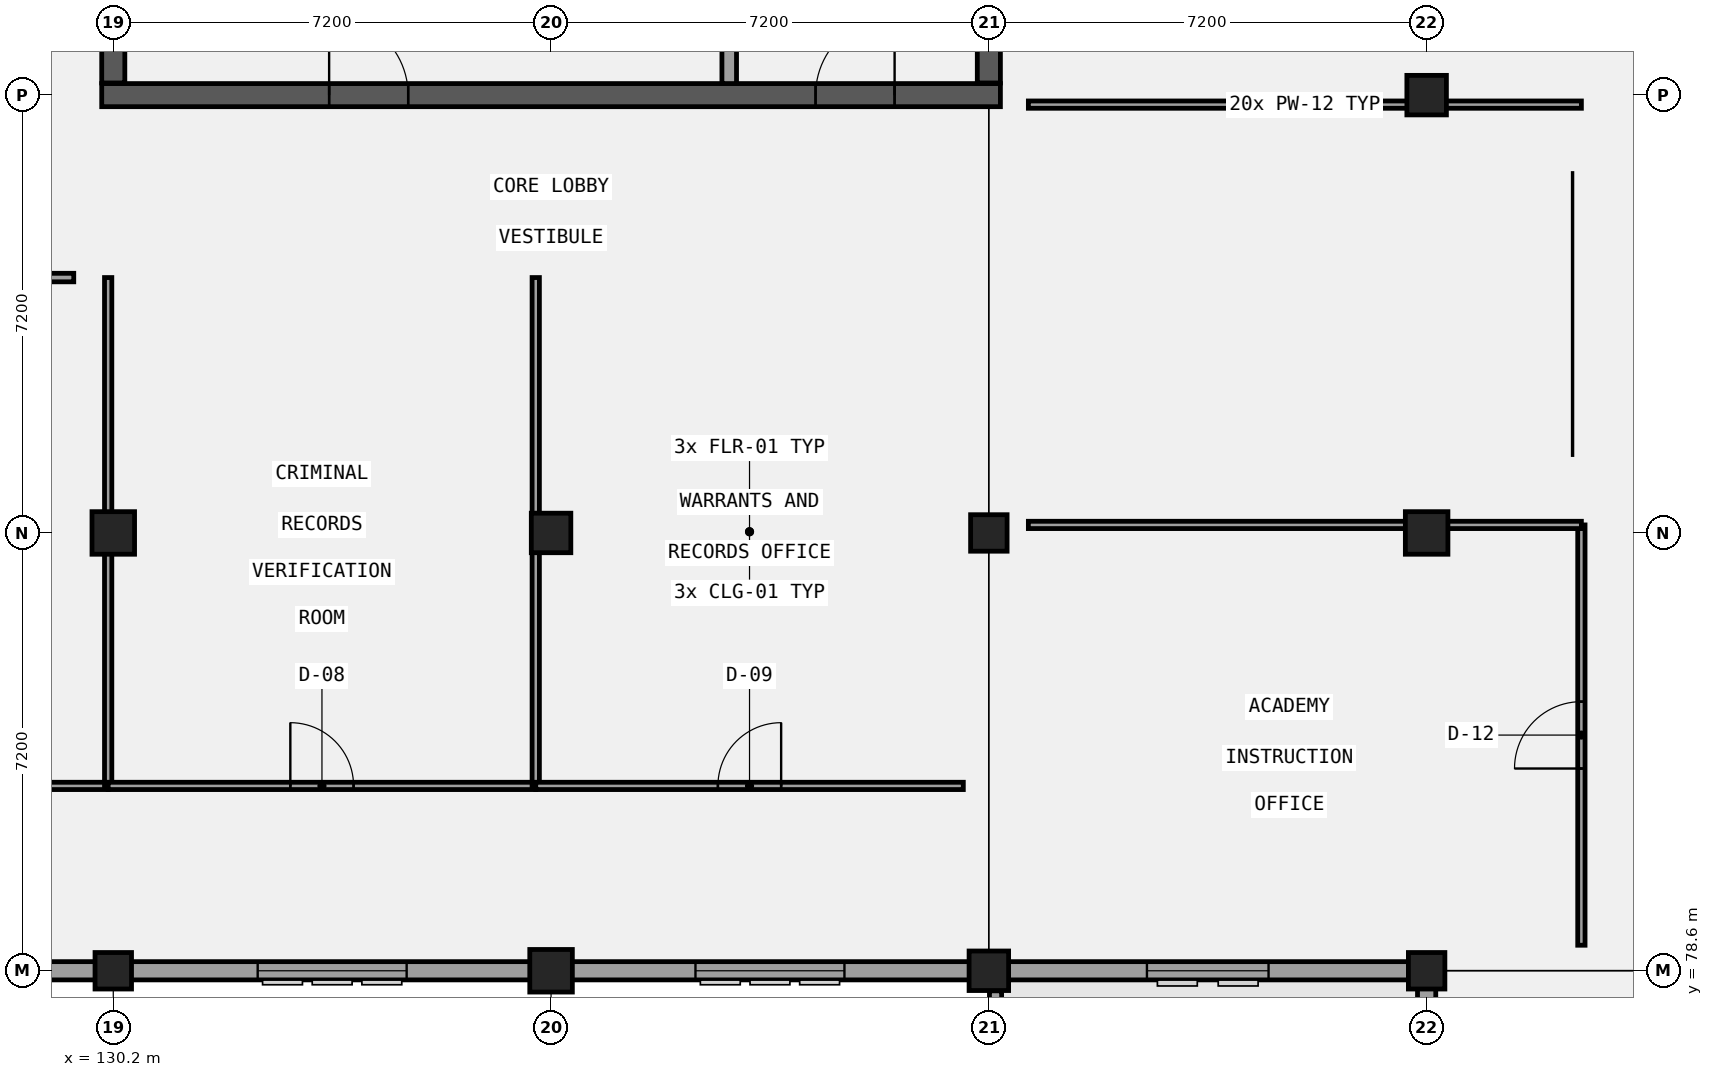
"""IFC4 building model, lengths in metres.
Left out: names, types, materials, properties, quantities, classifications, styles, units other than length and angle.
Written with IfcOpenShell. Run it as: python <this file> out.ifc"""

import sys

from ifc_helpers import new_model, si_unit, direction, frame, frame_2d, origin, origin_2d, place, context, subcontext, project, spatial, rectangle, extrude, element, fill, save


model = new_model("IFC4")
c1 = context("Model", 3, precision=1e-05, world=origin(), true_north=direction((0.0, 1.0)))
c2 = subcontext(c1, "Body", "Model", "MODEL_VIEW")
j1 = project(units=[si_unit("LENGTHUNIT", "METRE"), si_unit("PLANEANGLEUNIT", "RADIAN")], contexts=[c1])
p1 = place(None, origin())
s1 = spatial("IfcSite", under=j1, at=p1, CompositionType="ELEMENT")
p2 = place(p1, origin())
s2 = spatial("IfcBuilding", under=s1, at=p2, CompositionType="ELEMENT")
p3 = place(p2, frame((0.0, 0.0, 13.8)))
s3 = spatial("IfcBuildingStorey", under=s2, at=p3, CompositionType="ELEMENT", Elevation=13.8)
p4 = place(p3, frame((130.01, 93.0, 0.0), z_axis=(0.0, 0.0, 1.0), x_axis=(1.0, 0.0, 0.0)))
e1 = element("IfcWall", 1, at=p4, inside=s3, PredefinedType="SHEAR", context=c2, shape_type="SweptSolid", body=[
    extrude(rectangle(XDim=14.78, YDim=0.38, at=frame_2d((7.39, 0.0))), origin(), (0.0, 0.0, 1.0), 4.2),
])
p5 = place(p4, frame((3.74, 0.0, 0.0)))
e2 = element("IfcOpeningElement", 2, at=p5, cuts=e1, PredefinedType="OPENING", context=c2, shape_type="SweptSolid", body=[
    extrude(rectangle(XDim=1.3, YDim=2.2, at=frame_2d((0.65, 1.1))), frame((0.0, 0.2, 0.0), z_axis=(0.0, -1.0, 0.0), x_axis=(1.0, 0.0, 0.0)), (0.0, 0.0, 1.0), 0.4),
])
p6 = place(p4, frame((11.74, 0.0, 0.0)))
e3 = element("IfcOpeningElement", 3, at=p6, cuts=e1, PredefinedType="OPENING", context=c2, shape_type="SweptSolid", body=[
    extrude(rectangle(XDim=1.3, YDim=2.2, at=frame_2d((0.65, 1.1))), frame((0.0, 0.2, 0.0), z_axis=(0.0, -1.0, 0.0), x_axis=(1.0, 0.0, 0.0)), (0.0, 0.0, 1.0), 0.4),
])
for number, where, z_axis, x_axis in (
    (4, (130.2, 93.2, 0.0), (0.0, 0.0, 1.0), (0.0, 1.0, 0.0)),
    (5, (144.6, 93.2, 0.0), (0.0, 0.0, 1.0), (0.0, 1.0, 0.0)),
):
    element("IfcWall", number, at=place(p3, frame(where, z_axis=z_axis, x_axis=x_axis)), inside=s3, PredefinedType="SHEAR", context=c2, shape_type="SweptSolid", body=[
        extrude(rectangle(XDim=6.8, YDim=0.38, at=frame_2d((3.4, 0.0))), origin(), (0.0, 0.0, 1.0), 4.2),
    ])
p7 = place(p3, frame((130.2, 78.6, 0.0), z_axis=(0.0, 0.0, 1.0), x_axis=(1.0, 0.0, 0.0)))
e6 = element("IfcColumn", 6, at=p7, inside=s3, PredefinedType="COLUMN", context=c2, shape_type="SweptSolid", body=[
    extrude(rectangle(XDim=0.6, YDim=0.6, at=origin_2d()), origin(), (0.0, 0.0, 1.0), 4.2),
])
for number, where, z_axis, x_axis in (
    (7, (130.2, 85.8, 0.0), (0.0, 0.0, 1.0), (1.0, 0.0, 0.0)),
    (8, (137.4, 78.6, 0.0), (0.0, 0.0, 1.0), (1.0, 0.0, 0.0)),
):
    element("IfcColumn", number, at=place(p3, frame(where, z_axis=z_axis, x_axis=x_axis)), inside=s3, PredefinedType="COLUMN", context=c2, shape_type="SweptSolid", body=[
        extrude(rectangle(XDim=0.7, YDim=0.7, at=origin_2d()), origin(), (0.0, 0.0, 1.0), 4.2),
    ])
for number, where, z_axis, x_axis in (
    (9, (137.4, 85.8, 0.0), (0.0, 0.0, 1.0), (1.0, 0.0, 0.0)),
    (10, (144.6, 78.6, 0.0), (0.0, 0.0, 1.0), (1.0, 0.0, 0.0)),
):
    element("IfcColumn", number, at=place(p3, frame(where, z_axis=z_axis, x_axis=x_axis)), inside=s3, PredefinedType="COLUMN", context=c2, shape_type="SweptSolid", body=[
        extrude(rectangle(XDim=0.65, YDim=0.65, at=origin_2d()), origin(), (0.0, 0.0, 1.0), 4.2),
    ])
for number, where, z_axis, x_axis in (
    (11, (144.6, 85.8, 0.0), (0.0, 0.0, 1.0), (1.0, 0.0, 0.0)),
    (12, (151.8, 78.6, 0.0), (0.0, 0.0, 1.0), (1.0, 0.0, 0.0)),
):
    element("IfcColumn", number, at=place(p3, frame(where, z_axis=z_axis, x_axis=x_axis)), inside=s3, PredefinedType="COLUMN", context=c2, shape_type="SweptSolid", body=[
        extrude(rectangle(XDim=0.6, YDim=0.6, at=origin_2d()), origin(), (0.0, 0.0, 1.0), 4.2),
    ])
p8 = place(p3, frame((151.8, 85.8, 0.0), z_axis=(0.0, 0.0, 1.0), x_axis=(1.0, 0.0, 0.0)))
e13 = element("IfcColumn", 13, at=p8, inside=s3, PredefinedType="COLUMN", context=c2, shape_type="SweptSolid", body=[
    extrude(rectangle(XDim=0.7, YDim=0.7, at=origin_2d()), origin(), (0.0, 0.0, 1.0), 4.2),
])
p9 = place(p3, frame((151.8, 93.0, 0.0), z_axis=(0.0, 0.0, 1.0), x_axis=(1.0, 0.0, 0.0)))
e14 = element("IfcColumn", 14, at=p9, inside=s3, PredefinedType="COLUMN", context=c2, shape_type="SweptSolid", body=[
    extrude(rectangle(XDim=0.65, YDim=0.65, at=origin_2d()), origin(), (0.0, 0.0, 1.0), 4.2),
])
p10 = place(p3, frame((140.33, 93.19, 0.0), z_axis=(0.0, 0.0, 1.0), x_axis=(0.0, 1.0, 0.0)))
e15 = element("IfcWall", 15, at=p10, inside=s3, PredefinedType="SOLIDWALL", context=c2, shape_type="SweptSolid", body=[
    extrude(rectangle(XDim=3.24, YDim=0.24, at=frame_2d((1.62, 0.0))), origin(), (0.0, 0.0, 1.0), 3.91),
])
p11 = place(p3, frame((108.45, 78.6, 0.0), z_axis=(0.0, 0.0, 1.0), x_axis=(1.0, 0.0, 0.0)))
e16 = element("IfcWall", 16, at=p11, inside=s3, PredefinedType="SOLIDWALL", context=c2, shape_type="SweptSolid", body=[
    extrude(rectangle(XDim=36.3, YDim=0.3, at=frame_2d((18.15, 0.0))), origin(), (0.0, 0.0, 1.0), 2.94),
])
p12 = place(p11, frame((2.75, 0.0, 0.95)))
e17 = element("IfcOpeningElement", 17, at=p12, cuts=e16, PredefinedType="OPENING", context=c2, shape_type="SweptSolid", body=[
    extrude(rectangle(XDim=2.0, YDim=1.65, at=frame_2d((1.0, 0.825))), frame((0.0, 0.16, 0.0), z_axis=(0.0, -1.0, 0.0), x_axis=(1.0, 0.0, 0.0)), (0.0, 0.0, 1.0), 0.32),
])
p13 = place(p11, frame((9.85, 0.0, 0.95)))
e18 = element("IfcOpeningElement", 18, at=p13, cuts=e16, PredefinedType="OPENING", context=c2, shape_type="SweptSolid", body=[
    extrude(rectangle(XDim=2.2, YDim=1.4, at=frame_2d((1.1, 0.7))), frame((0.0, 0.16, 0.0), z_axis=(0.0, -1.0, 0.0), x_axis=(1.0, 0.0, 0.0)), (0.0, 0.0, 1.0), 0.32),
])
p14 = place(p11, frame((17.05, 0.0, 0.95)))
e19 = element("IfcOpeningElement", 19, at=p14, cuts=e16, PredefinedType="OPENING", context=c2, shape_type="SweptSolid", body=[
    extrude(rectangle(XDim=2.2, YDim=1.65, at=frame_2d((1.1, 0.825))), frame((0.0, 0.16, 0.0), z_axis=(0.0, -1.0, 0.0), x_axis=(1.0, 0.0, 0.0)), (0.0, 0.0, 1.0), 0.32),
])
p15 = place(p11, frame((24.125, 0.0, 0.95)))
e20 = element("IfcOpeningElement", 20, at=p15, cuts=e16, PredefinedType="OPENING", context=c2, shape_type="SweptSolid", body=[
    extrude(rectangle(XDim=2.45, YDim=1.4, at=frame_2d((1.225, 0.7))), frame((0.0, 0.16, 0.0), z_axis=(0.0, -1.0, 0.0), x_axis=(1.0, 0.0, 0.0)), (0.0, 0.0, 1.0), 0.32),
])
p16 = place(p11, frame((31.325, 0.0, 0.95)))
e21 = element("IfcOpeningElement", 21, at=p16, cuts=e16, PredefinedType="OPENING", context=c2, shape_type="SweptSolid", body=[
    extrude(rectangle(XDim=2.45, YDim=1.65, at=frame_2d((1.225, 0.825))), frame((0.0, 0.16, 0.0), z_axis=(0.0, -1.0, 0.0), x_axis=(1.0, 0.0, 0.0)), (0.0, 0.0, 1.0), 0.32),
])
p17 = place(p3, frame((144.45, 78.6, 0.0), z_axis=(0.0, 0.0, 1.0), x_axis=(1.0, 0.0, 0.0)))
e22 = element("IfcWall", 22, at=p17, inside=s3, PredefinedType="SOLIDWALL", context=c2, shape_type="SweptSolid", body=[
    extrude(rectangle(XDim=7.5, YDim=0.3, at=frame_2d((3.75, 0.0))), origin(), (0.0, 0.0, 1.0), 2.94),
])
p18 = place(p17, frame((2.75, 0.0, 0.95)))
e23 = element("IfcOpeningElement", 23, at=p18, cuts=e22, PredefinedType="OPENING", context=c2, shape_type="SweptSolid", body=[
    extrude(rectangle(XDim=2.0, YDim=1.65, at=frame_2d((1.0, 0.825))), frame((0.0, 0.16, 0.0), z_axis=(0.0, -1.0, 0.0), x_axis=(1.0, 0.0, 0.0)), (0.0, 0.0, 1.0), 0.32),
])
p19 = place(p3, frame((151.8, 78.45, 0.0), z_axis=(0.0, 0.0, 1.0), x_axis=(0.0, -1.0, 0.0)))
e24 = element("IfcWall", 24, at=p19, inside=s3, PredefinedType="SOLIDWALL", context=c2, shape_type="SweptSolid", body=[
    extrude(rectangle(XDim=28.46, YDim=0.3, at=frame_2d((14.23, 0.0))), origin(), (0.0, 0.0, 1.0), 3.19),
])
p20 = place(p19, frame((17.08, 0.0, 0.0)))
e25 = element("IfcOpeningElement", 25, at=p20, cuts=e24, PredefinedType="OPENING", context=c2, shape_type="SweptSolid", body=[
    extrude(rectangle(XDim=1.1, YDim=2.2, at=frame_2d((0.55, 1.1))), frame((0.0, 0.16, 0.0), z_axis=(0.0, -1.0, 0.0), x_axis=(1.0, 0.0, 0.0)), (0.0, 0.0, 1.0), 0.32),
])
p21 = place(p19, frame((24.53, 0.0, 1.0)))
e26 = element("IfcOpeningElement", 26, at=p21, cuts=e24, PredefinedType="OPENING", context=c2, shape_type="SweptSolid", body=[
    extrude(rectangle(XDim=0.85, YDim=1.65, at=frame_2d((0.425, 0.825))), frame((0.0, 0.16, 0.0), z_axis=(0.0, -1.0, 0.0), x_axis=(1.0, 0.0, 0.0)), (0.0, 0.0, 1.0), 0.32),
])
p22 = place(p19, frame((10.225, 0.0, 1.0)))
e27 = element("IfcOpeningElement", 27, at=p22, cuts=e24, PredefinedType="OPENING", context=c2, shape_type="SweptSolid", body=[
    extrude(rectangle(XDim=0.85, YDim=1.65, at=frame_2d((0.425, 0.825))), frame((0.0, 0.16, 0.0), z_axis=(0.0, -1.0, 0.0), x_axis=(1.0, 0.0, 0.0)), (0.0, 0.0, 1.0), 0.32),
])
p23 = place(p19, frame((3.1, 0.0, 1.0)))
e28 = element("IfcOpeningElement", 28, at=p23, cuts=e24, PredefinedType="OPENING", context=c2, shape_type="SweptSolid", body=[
    extrude(rectangle(XDim=0.85, YDim=1.65, at=frame_2d((0.425, 0.825))), frame((0.0, 0.16, 0.0), z_axis=(0.0, -1.0, 0.0), x_axis=(1.0, 0.0, 0.0)), (0.0, 0.0, 1.0), 0.32),
])
p24 = place(p3, frame((144.71, 35.51, 0.0), z_axis=(0.0, 0.0, 1.0), x_axis=(0.0, 1.0, 0.0)))
e29 = element("IfcWall", 29, at=p24, inside=s3, PredefinedType="PARAPET", context=c2, shape_type="SweptSolid", body=[
    extrude(rectangle(XDim=42.76, YDim=0.2, at=frame_2d((21.38, 0.0))), origin(), (0.0, 0.0, 1.0), 1.12),
])
p25 = place(p3, frame((123.084, 81.64, 0.0), z_axis=(0.0, 0.0, 1.0), x_axis=(1.0, 0.0, 0.0)))
e30 = element("IfcWall", 30, at=p25, inside=s3, PredefinedType="PARTITIONING", context=c2, shape_type="SweptSolid", body=[
    extrude(rectangle(XDim=7.032, YDim=0.12, at=frame_2d((3.516, 0.0))), origin(), (0.0, 0.0, 1.0), 3.94),
])
p26 = place(p25, frame((2.996, 0.0, 0.0)))
e31 = element("IfcOpeningElement", 31, at=p26, cuts=e30, PredefinedType="OPENING", context=c2, shape_type="SweptSolid", body=[
    extrude(rectangle(XDim=1.04, YDim=2.1, at=frame_2d((0.52, 1.05))), frame((0.0, 0.07, 0.0), z_axis=(0.0, -1.0, 0.0), x_axis=(1.0, 0.0, 0.0)), (0.0, 0.0, 1.0), 0.14),
])
p27 = place(p3, frame((130.116, 81.64, 0.0), z_axis=(0.0, 0.0, 1.0), x_axis=(0.0, 1.0, 0.0)))
e32 = element("IfcWall", 32, at=p27, inside=s3, PredefinedType="PARTITIONING", context=c2, shape_type="SweptSolid", body=[
    extrude(rectangle(XDim=8.36, YDim=0.12, at=frame_2d((4.18, 0.0))), origin(), (0.0, 0.0, 1.0), 3.29),
])
p28 = place(p3, frame((130.116, 81.64, 0.0), z_axis=(0.0, 0.0, 1.0), x_axis=(1.0, 0.0, 0.0)))
e33 = element("IfcWall", 33, at=p28, inside=s3, PredefinedType="PARTITIONING", context=c2, shape_type="SweptSolid", body=[
    extrude(rectangle(XDim=7.032, YDim=0.12, at=frame_2d((3.516, 0.0))), origin(), (0.0, 0.0, 1.0), 3.94),
])
p29 = place(p28, frame((2.996, 0.0, 0.0)))
e34 = element("IfcOpeningElement", 34, at=p29, cuts=e33, PredefinedType="OPENING", context=c2, shape_type="SweptSolid", body=[
    extrude(rectangle(XDim=1.04, YDim=2.22, at=frame_2d((0.52, 1.11))), frame((0.0, 0.07, 0.0), z_axis=(0.0, -1.0, 0.0), x_axis=(1.0, 0.0, 0.0)), (0.0, 0.0, 1.0), 0.14),
])
p30 = place(p3, frame((137.148, 81.64, 0.0), z_axis=(0.0, 0.0, 1.0), x_axis=(0.0, 1.0, 0.0)))
e35 = element("IfcWall", 35, at=p30, inside=s3, PredefinedType="PARTITIONING", context=c2, shape_type="SweptSolid", body=[
    extrude(rectangle(XDim=8.36, YDim=0.12, at=frame_2d((4.18, 0.0))), origin(), (0.0, 0.0, 1.0), 3.19),
])
p31 = place(p3, frame((137.148, 81.64, 0.0), z_axis=(0.0, 0.0, 1.0), x_axis=(1.0, 0.0, 0.0)))
e36 = element("IfcWall", 36, at=p31, inside=s3, PredefinedType="PARTITIONING", context=c2, shape_type="SweptSolid", body=[
    extrude(rectangle(XDim=7.032, YDim=0.12, at=frame_2d((3.516, 0.0))), origin(), (0.0, 0.0, 1.0), 3.94),
])
p32 = place(p31, frame((2.996, 0.0, 0.0)))
e37 = element("IfcOpeningElement", 37, at=p32, cuts=e36, PredefinedType="OPENING", context=c2, shape_type="SweptSolid", body=[
    extrude(rectangle(XDim=1.04, YDim=2.35, at=frame_2d((0.52, 1.175))), frame((0.0, 0.07, 0.0), z_axis=(0.0, -1.0, 0.0), x_axis=(1.0, 0.0, 0.0)), (0.0, 0.0, 1.0), 0.14),
])
p33 = place(p3, frame((126.27, 90.0, 0.0), z_axis=(0.0, 0.0, 1.0), x_axis=(1.0, 0.0, 0.0)))
e38 = element("IfcWall", 38, at=p33, inside=s3, PredefinedType="PARTITIONING", context=c2, shape_type="SweptSolid", body=[
    extrude(rectangle(XDim=3.28, YDim=0.14, at=frame_2d((1.64, 0.0))), origin(), (0.0, 0.0, 1.0), 3.94),
])
p34 = place(p3, frame((154.345, 79.02, 0.0), z_axis=(0.0, 0.0, 1.0), x_axis=(0.0, 1.0, 0.0)))
e39 = element("IfcWall", 39, at=p34, inside=s3, PredefinedType="PARTITIONING", context=c2, shape_type="SweptSolid", body=[
    extrude(rectangle(XDim=6.912, YDim=0.12, at=frame_2d((3.456, 0.0))), origin(), (0.0, 0.0, 1.0), 3.94),
])
p35 = place(p34, frame((2.906, 0.0, 0.0)))
e40 = element("IfcOpeningElement", 40, at=p35, cuts=e39, PredefinedType="OPENING", context=c2, shape_type="SweptSolid", body=[
    extrude(rectangle(XDim=1.1, YDim=2.35, at=frame_2d((0.55, 1.175))), frame((0.0, 0.07, 0.0), z_axis=(0.0, -1.0, 0.0), x_axis=(1.0, 0.0, 0.0)), (0.0, 0.0, 1.0), 0.14),
])
p36 = place(p3, frame((145.25, 85.932, 0.0), z_axis=(0.0, 0.0, 1.0), x_axis=(1.0, 0.0, 0.0)))
e41 = element("IfcWall", 41, at=p36, inside=s3, PredefinedType="PARTITIONING", context=c2, shape_type="SweptSolid", body=[
    extrude(rectangle(XDim=9.095, YDim=0.12, at=frame_2d((4.547, 0.0))), origin(), (0.0, 0.0, 1.0), 3.29),
])
p37 = place(p3, frame((145.25, 92.844, 0.0), z_axis=(0.0, 0.0, 1.0), x_axis=(1.0, 0.0, 0.0)))
e42 = element("IfcWall", 42, at=p37, inside=s3, PredefinedType="PARTITIONING", context=c2, shape_type="SweptSolid", body=[
    extrude(rectangle(XDim=9.095, YDim=0.12, at=frame_2d((4.547, 0.0))), origin(), (0.0, 0.0, 1.0), 3.19),
])
p38 = place(p5, frame((1.3, 0.0, 0.0), z_axis=(0.0, 0.0, 1.0), x_axis=(-1.0, 0.0, 0.0)))
e43 = element("IfcDoor", 43, at=p38, inside=s3, OperationType="SINGLE_SWING_LEFT", PredefinedType="DOOR", context=c2, shape_type="SweptSolid", body=[
    extrude(rectangle(XDim=1.3, YDim=2.2, at=frame_2d((0.65, 1.1))), frame((0.0, 0.025, 0.0), z_axis=(0.0, -1.0, 0.0), x_axis=(1.0, 0.0, 0.0)), (0.0, 0.0, 1.0), 0.05),
])
fill(e2, e43)
p39 = place(p6, frame((1.3, 0.0, 0.0), z_axis=(0.0, 0.0, 1.0), x_axis=(-1.0, 0.0, 0.0)))
e44 = element("IfcDoor", 44, at=p39, inside=s3, OperationType="SINGLE_SWING_RIGHT", PredefinedType="DOOR", context=c2, shape_type="SweptSolid", body=[
    extrude(rectangle(XDim=1.3, YDim=2.2, at=frame_2d((0.65, 1.1))), frame((0.0, 0.025, 0.0), z_axis=(0.0, -1.0, 0.0), x_axis=(1.0, 0.0, 0.0)), (0.0, 0.0, 1.0), 0.05),
])
fill(e3, e44)
p40 = place(p15, origin())
e45 = element("IfcWindow", 45, at=p40, inside=s3, PartitioningType="SINGLE_PANEL", PredefinedType="WINDOW", context=c2, shape_type="SweptSolid", body=[
    extrude(rectangle(XDim=2.45, YDim=1.4, at=frame_2d((1.225, 0.7))), frame((0.0, 0.03, 0.0), z_axis=(0.0, -1.0, 0.0), x_axis=(1.0, 0.0, 0.0)), (0.0, 0.0, 1.0), 0.06),
])
fill(e20, e45)
p41 = place(p16, origin())
e46 = element("IfcWindow", 46, at=p41, inside=s3, PartitioningType="SINGLE_PANEL", PredefinedType="WINDOW", context=c2, shape_type="SweptSolid", body=[
    extrude(rectangle(XDim=2.45, YDim=1.65, at=frame_2d((1.225, 0.825))), frame((0.0, 0.03, 0.0), z_axis=(0.0, -1.0, 0.0), x_axis=(1.0, 0.0, 0.0)), (0.0, 0.0, 1.0), 0.06),
])
fill(e21, e46)
p42 = place(p18, origin())
e47 = element("IfcWindow", 47, at=p42, inside=s3, PartitioningType="SINGLE_PANEL", PredefinedType="WINDOW", context=c2, shape_type="SweptSolid", body=[
    extrude(rectangle(XDim=2.0, YDim=1.65, at=frame_2d((1.0, 0.825))), frame((0.0, 0.03, 0.0), z_axis=(0.0, -1.0, 0.0), x_axis=(1.0, 0.0, 0.0)), (0.0, 0.0, 1.0), 0.06),
])
fill(e23, e47)
p43 = place(p29, origin())
e48 = element("IfcDoor", 48, at=p43, inside=s3, OperationType="SINGLE_SWING_LEFT", PredefinedType="DOOR", context=c2, shape_type="SweptSolid", body=[
    extrude(rectangle(XDim=1.04, YDim=2.22, at=frame_2d((0.52, 1.11))), frame((0.0, 0.025, 0.0), z_axis=(0.0, -1.0, 0.0), x_axis=(1.0, 0.0, 0.0)), (0.0, 0.0, 1.0), 0.05),
])
fill(e34, e48)
p44 = place(p32, origin())
e49 = element("IfcDoor", 49, at=p44, inside=s3, OperationType="SINGLE_SWING_RIGHT", PredefinedType="DOOR", context=c2, shape_type="SweptSolid", body=[
    extrude(rectangle(XDim=1.04, YDim=2.35, at=frame_2d((0.52, 1.175))), frame((0.0, 0.025, 0.0), z_axis=(0.0, -1.0, 0.0), x_axis=(1.0, 0.0, 0.0)), (0.0, 0.0, 1.0), 0.05),
])
fill(e37, e49)
p45 = place(p35, frame((1.1, 0.0, 0.0), z_axis=(0.0, 0.0, 1.0), x_axis=(-1.0, 0.0, 0.0)))
e50 = element("IfcDoor", 50, at=p45, inside=s3, OperationType="SINGLE_SWING_LEFT", PredefinedType="DOOR", context=c2, shape_type="SweptSolid", body=[
    extrude(rectangle(XDim=1.1, YDim=2.35, at=frame_2d((0.55, 1.175))), frame((0.0, 0.025, 0.0), z_axis=(0.0, -1.0, 0.0), x_axis=(1.0, 0.0, 0.0)), (0.0, 0.0, 1.0), 0.05),
])
fill(e40, e50)
save(model, sys.argv[1])
